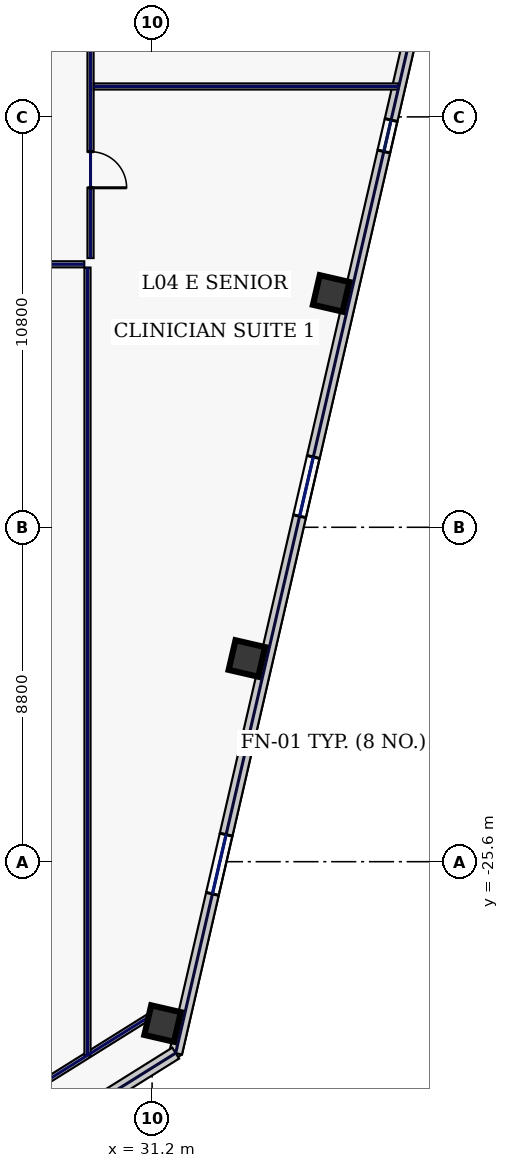
"""IFC4 building model, lengths in metres.
Left out: names, types, materials, properties, quantities, classifications, styles, units other than length and angle.
Written with IfcOpenShell. Run it as: python <this file> out.ifc"""

import sys

from ifc_helpers import new_model, si_unit, direction, frame, frame_2d, origin, origin_2d, place, context, subcontext, project, spatial, rectangle, hollow_rectangle, extrude, element, fill, save


model = new_model("IFC4")
c1 = context("Model", 3, precision=1e-05, world=origin(), true_north=direction((0.0, 1.0)))
c2 = subcontext(c1, "Body", "Model", "MODEL_VIEW")
j1 = project(units=[si_unit("LENGTHUNIT", "METRE"), si_unit("PLANEANGLEUNIT", "RADIAN")], contexts=[c1])
p1 = place(None, origin())
s1 = spatial("IfcSite", under=j1, at=p1, CompositionType="ELEMENT")
p2 = place(p1, origin())
s2 = spatial("IfcBuilding", under=s1, at=p2, CompositionType="ELEMENT")
p3 = place(p2, frame((0.0, 0.0, 23.4)))
s3 = spatial("IfcBuildingStorey", under=s2, at=p3, CompositionType="ELEMENT", Elevation=23.4)
for number, where, z_axis, x_axis in (
    (1, (31.476, -29.86, 0.0), (0.0, 0.0, 1.0), (0.974, -0.225, 0.0)),
    (2, (33.694, -20.252, 0.0), (0.0, 0.0, 1.0), (0.974, -0.225, 0.0)),
    (3, (35.912, -10.645, 0.0), (0.0, 0.0, 1.0), (0.974, -0.225, 0.0)),
):
    element("IfcColumn", number, at=place(p3, frame(where, z_axis=z_axis, x_axis=x_axis)), inside=s3, PredefinedType="COLUMN", context=c2, shape_type="SweptSolid", body=[
        extrude(hollow_rectangle(XDim=0.8, YDim=0.8, WallThickness=0.036, at=origin_2d()), origin(), (0.0, 0.0, 1.0), 4.7),
    ])
p4 = place(p3, frame((31.82, -30.637, 0.0), z_axis=(0.0, 0.0, 1.0), x_axis=(0.224949969076, 0.974370315338, 0.0)))
e4 = element("IfcWall", 4, at=p4, inside=s3, PredefinedType="STANDARD", context=c2, shape_type="SweptSolid", body=[
    extrude(rectangle(XDim=40.8, YDim=0.34, at=frame_2d((20.4, 0.0))), origin(), (0.0, 0.0, 1.0), 4.7),
])
p5 = place(p4, frame((4.3, 0.0, 0.58)))
e5 = element("IfcOpeningElement", 5, at=p5, cuts=e4, PredefinedType="OPENING", context=c2, shape_type="SweptSolid", body=[
    extrude(rectangle(XDim=1.6, YDim=2.3, at=frame_2d((0.8, 1.15))), frame((0.0, 0.18, 0.0), z_axis=(0.0, -1.0, 0.0), x_axis=(1.0, 0.0, 0.0)), (0.0, 0.0, 1.0), 0.36),
])
p6 = place(p4, frame((14.5, 0.0, 0.58)))
e6 = element("IfcOpeningElement", 6, at=p6, cuts=e4, PredefinedType="OPENING", context=c2, shape_type="SweptSolid", body=[
    extrude(rectangle(XDim=1.6, YDim=2.3, at=frame_2d((0.8, 1.15))), frame((0.0, 0.18, 0.0), z_axis=(0.0, -1.0, 0.0), x_axis=(1.0, 0.0, 0.0)), (0.0, 0.0, 1.0), 0.36),
])
p7 = place(p4, frame((24.35, 0.0, 0.75)))
e7 = element("IfcOpeningElement", 7, at=p7, cuts=e4, PredefinedType="OPENING", context=c2, shape_type="SweptSolid", body=[
    extrude(rectangle(XDim=0.85, YDim=1.85, at=frame_2d((0.425, 0.925))), frame((0.0, 0.18, 0.0), z_axis=(0.0, -1.0, 0.0), x_axis=(1.0, 0.0, 0.0)), (0.0, 0.0, 1.0), 0.36),
])
p8 = place(p4, frame((34.55, 0.0, 0.75)))
e8 = element("IfcOpeningElement", 8, at=p8, cuts=e4, PredefinedType="OPENING", context=c2, shape_type="SweptSolid", body=[
    extrude(rectangle(XDim=0.85, YDim=1.85, at=frame_2d((0.425, 0.925))), frame((0.0, 0.18, 0.0), z_axis=(0.0, -1.0, 0.0), x_axis=(1.0, 0.0, 0.0)), (0.0, 0.0, 1.0), 0.36),
])
p9 = place(p3, frame((25.788, -34.406, 0.0), z_axis=(0.0, 0.0, 1.0), x_axis=(0.848046504656, 0.529921811158, 0.0)))
e9 = element("IfcWall", 9, at=p9, inside=s3, PredefinedType="STANDARD", context=c2, shape_type="SweptSolid", body=[
    extrude(rectangle(XDim=7.113, YDim=0.34, at=frame_2d((3.557, 0.0))), origin(), (0.0, 0.0, 1.0), 4.7),
])
p10 = place(p3, frame((25.06, -33.468, 0.0), z_axis=(0.0, 0.0, 1.0), x_axis=(0.848043064089, 0.529927317139, 0.0)))
e10 = element("IfcWall", 10, at=p10, inside=s3, PredefinedType="PARTITIONING", context=c2, shape_type="SweptSolid", body=[
    extrude(rectangle(XDim=7.354, YDim=0.16, at=frame_2d((3.677, 0.0))), origin(), (0.0, 0.0, 1.0), 4.7),
])
p11 = place(p3, frame((29.58, 9.715, 0.0), z_axis=(0.0, 0.0, 1.0), x_axis=(0.0, -1.0, 0.0)))
e11 = element("IfcWall", 11, at=p11, inside=s3, PredefinedType="PARTITIONING", context=c2, shape_type="SweptSolid", body=[
    extrude(rectangle(XDim=19.43, YDim=0.16, at=frame_2d((9.715, 0.0))), origin(), (0.0, 0.0, 1.0), 4.7),
])
p12 = place(p11, frame((16.631, 0.0, 0.0)))
e12 = element("IfcOpeningElement", 12, at=p12, cuts=e11, PredefinedType="OPENING", context=c2, shape_type="SweptSolid", body=[
    extrude(rectangle(XDim=0.95, YDim=2.2, at=frame_2d((0.475, 1.1))), frame((0.0, 0.09, 0.0), z_axis=(0.0, -1.0, 0.0), x_axis=(1.0, 0.0, 0.0)), (0.0, 0.0, 1.0), 0.18),
])
p13 = place(p11, frame((11.925, 0.0, 0.0)))
e13 = element("IfcOpeningElement", 13, at=p13, cuts=e11, PredefinedType="OPENING", context=c2, shape_type="SweptSolid", body=[
    extrude(rectangle(XDim=0.95, YDim=2.2, at=frame_2d((0.475, 1.1))), frame((0.0, 0.09, 0.0), z_axis=(0.0, -1.0, 0.0), x_axis=(1.0, 0.0, 0.0)), (0.0, 0.0, 1.0), 0.18),
])
p14 = place(p11, frame((6.725, 0.0, 0.0)))
e14 = element("IfcOpeningElement", 14, at=p14, cuts=e11, PredefinedType="OPENING", context=c2, shape_type="SweptSolid", body=[
    extrude(rectangle(XDim=0.95, YDim=2.2, at=frame_2d((0.475, 1.1))), frame((0.0, 0.09, 0.0), z_axis=(0.0, -1.0, 0.0), x_axis=(1.0, 0.0, 0.0)), (0.0, 0.0, 1.0), 0.18),
])
p15 = place(p11, frame((2.019, 0.0, 0.0)))
e15 = element("IfcOpeningElement", 15, at=p15, cuts=e11, PredefinedType="OPENING", context=c2, shape_type="SweptSolid", body=[
    extrude(rectangle(XDim=0.95, YDim=2.2, at=frame_2d((0.475, 1.1))), frame((0.0, 0.09, 0.0), z_axis=(0.0, -1.0, 0.0), x_axis=(1.0, 0.0, 0.0)), (0.0, 0.0, 1.0), 0.18),
])
p16 = place(p3, frame((29.415, -9.88, 0.0), z_axis=(0.0, 0.0, 1.0), x_axis=(-1.0, 0.0, 0.0)))
e16 = element("IfcWall", 16, at=p16, inside=s3, PredefinedType="PARTITIONING", context=c2, shape_type="SweptSolid", body=[
    extrude(rectangle(XDim=22.5, YDim=0.16, at=frame_2d((11.25, 0.0))), origin(), (0.0, 0.0, 1.0), 4.7),
])
p17 = place(p16, frame((15.225, 0.0, 0.0)))
e17 = element("IfcOpeningElement", 17, at=p17, cuts=e16, PredefinedType="OPENING", context=c2, shape_type="SweptSolid", body=[
    extrude(rectangle(XDim=0.95, YDim=2.2, at=frame_2d((0.475, 1.1))), frame((0.0, 0.09, 0.0), z_axis=(0.0, -1.0, 0.0), x_axis=(1.0, 0.0, 0.0)), (0.0, 0.0, 1.0), 0.18),
])
p18 = place(p16, frame((10.8, 0.0, 0.0)))
e18 = element("IfcOpeningElement", 18, at=p18, cuts=e16, PredefinedType="OPENING", context=c2, shape_type="SweptSolid", body=[
    extrude(rectangle(XDim=0.95, YDim=2.2, at=frame_2d((0.475, 1.1))), frame((0.0, 0.09, 0.0), z_axis=(0.0, -1.0, 0.0), x_axis=(1.0, 0.0, 0.0)), (0.0, 0.0, 1.0), 0.18),
])
p19 = place(p16, frame((7.2, 0.0, 0.0)))
e19 = element("IfcOpeningElement", 19, at=p19, cuts=e16, PredefinedType="OPENING", context=c2, shape_type="SweptSolid", body=[
    extrude(rectangle(XDim=0.95, YDim=2.2, at=frame_2d((0.475, 1.1))), frame((0.0, 0.09, 0.0), z_axis=(0.0, -1.0, 0.0), x_axis=(1.0, 0.0, 0.0)), (0.0, 0.0, 1.0), 0.18),
])
p20 = place(p16, frame((2.594, 0.0, 0.0)))
e20 = element("IfcOpeningElement", 20, at=p20, cuts=e16, PredefinedType="OPENING", context=c2, shape_type="SweptSolid", body=[
    extrude(rectangle(XDim=1.3, YDim=2.2, at=frame_2d((0.65, 1.1))), frame((0.0, 0.09, 0.0), z_axis=(0.0, -1.0, 0.0), x_axis=(1.0, 0.0, 0.0)), (0.0, 0.0, 1.0), 0.18),
])
p21 = place(p3, frame((29.5, -30.703, 0.0), z_axis=(0.0, 0.0, 1.0), x_axis=(0.0, 1.0, 0.0)))
e21 = element("IfcWall", 21, at=p21, inside=s3, PredefinedType="PARTITIONING", context=c2, shape_type="SweptSolid", body=[
    extrude(rectangle(XDim=20.738, YDim=0.16, at=frame_2d((10.369, 0.0))), origin(), (0.0, 0.0, 1.0), 4.7),
])
p22 = place(p3, frame((29.665, -5.2, 0.0), z_axis=(0.0, 0.0, 1.0), x_axis=(1.0, 0.0, 0.0)))
e22 = element("IfcWall", 22, at=p22, inside=s3, PredefinedType="PARTITIONING", context=c2, shape_type="SweptSolid", body=[
    extrude(rectangle(XDim=8.007, YDim=0.16, at=frame_2d((4.003, 0.0))), origin(), (0.0, 0.0, 1.0), 4.7),
])
p23 = place(p5, origin())
e23 = element("IfcWindow", 23, at=p23, inside=s3, PartitioningType="SINGLE_PANEL", PredefinedType="WINDOW", context=c2, shape_type="SweptSolid", body=[
    extrude(rectangle(XDim=1.6, YDim=2.3, at=frame_2d((0.8, 1.15))), frame((0.0, 0.03, 0.0), z_axis=(0.0, -1.0, 0.0), x_axis=(1.0, 0.0, 0.0)), (0.0, 0.0, 1.0), 0.06),
])
fill(e5, e23)
p24 = place(p6, origin())
e24 = element("IfcWindow", 24, at=p24, inside=s3, PartitioningType="SINGLE_PANEL", PredefinedType="WINDOW", context=c2, shape_type="SweptSolid", body=[
    extrude(rectangle(XDim=1.6, YDim=2.3, at=frame_2d((0.8, 1.15))), frame((0.0, 0.03, 0.0), z_axis=(0.0, -1.0, 0.0), x_axis=(1.0, 0.0, 0.0)), (0.0, 0.0, 1.0), 0.06),
])
fill(e6, e24)
p25 = place(p7, origin())
e25 = element("IfcWindow", 25, at=p25, inside=s3, PartitioningType="SINGLE_PANEL", PredefinedType="WINDOW", context=c2, shape_type="SweptSolid", body=[
    extrude(rectangle(XDim=0.85, YDim=1.85, at=frame_2d((0.425, 0.925))), frame((0.0, 0.03, 0.0), z_axis=(0.0, -1.0, 0.0), x_axis=(1.0, 0.0, 0.0)), (0.0, 0.0, 1.0), 0.06),
])
fill(e7, e25)
p26 = place(p12, origin())
e26 = element("IfcDoor", 26, at=p26, inside=s3, OperationType="SINGLE_SWING_RIGHT", PredefinedType="DOOR", context=c2, shape_type="SweptSolid", body=[
    extrude(rectangle(XDim=0.95, YDim=2.2, at=frame_2d((0.475, 1.1))), frame((0.0, 0.025, 0.0), z_axis=(0.0, -1.0, 0.0), x_axis=(1.0, 0.0, 0.0)), (0.0, 0.0, 1.0), 0.05),
])
fill(e12, e26)
save(model, sys.argv[1])
